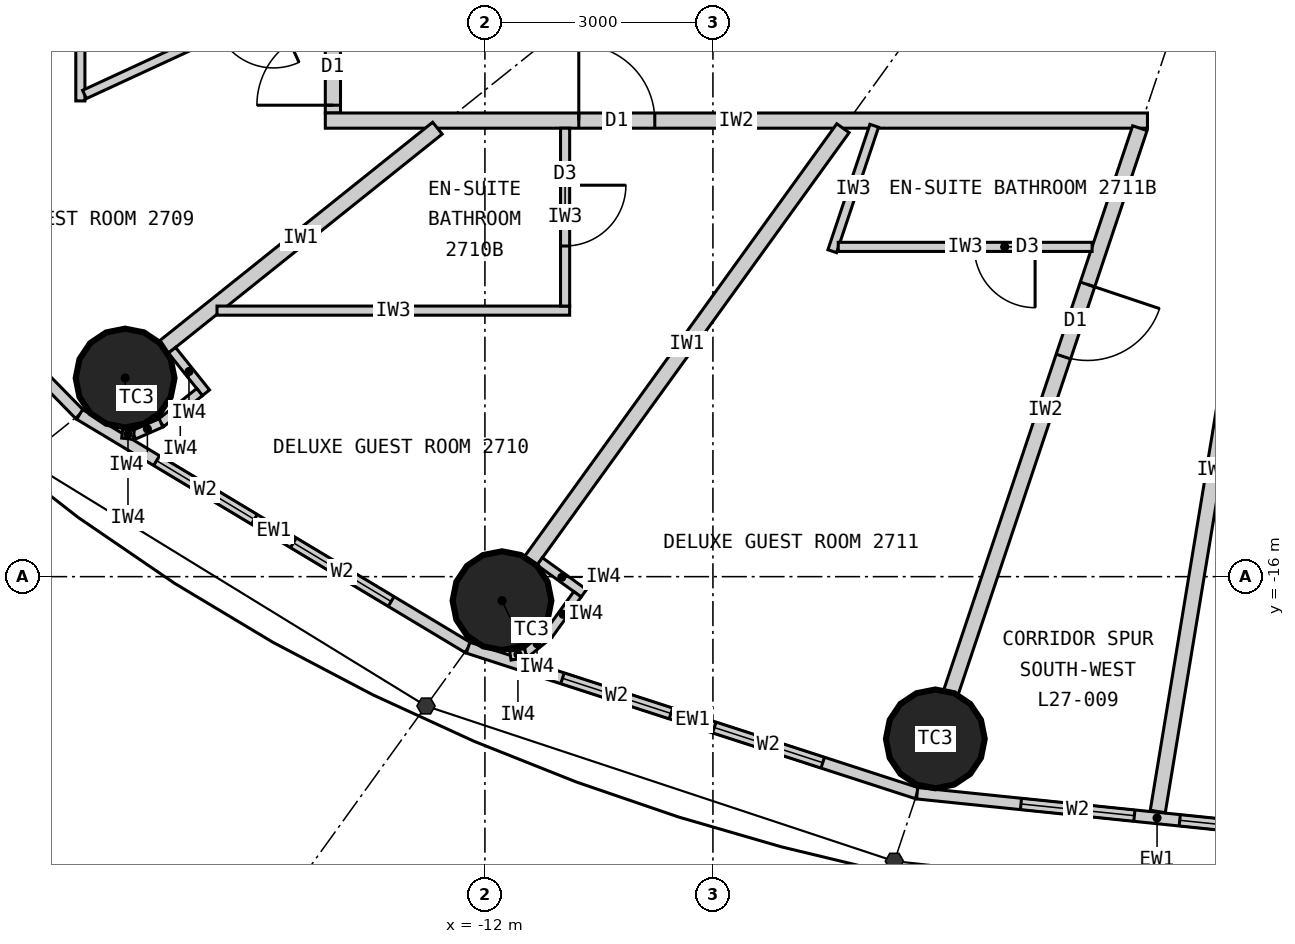
"""IFC4 building model, lengths in metres.
Left out: names, types, materials, properties, quantities, classifications, styles, units other than length and angle.
Written with IfcOpenShell. Run it as: python <this file> out.ifc"""

import sys

from ifc_helpers import new_model, si_unit, direction, frame, frame_2d, origin, origin_2d, place, context, subcontext, project, spatial, rectangle, circle, extrude, element, fill, save


model = new_model("IFC4")
c1 = context("Model", 3, precision=1e-05, world=origin(), true_north=direction((0.0, 1.0)))
c2 = subcontext(c1, "Body", "Model", "MODEL_VIEW")
j1 = project(units=[si_unit("LENGTHUNIT", "METRE"), si_unit("PLANEANGLEUNIT", "RADIAN")], contexts=[c1])
p1 = place(None, origin())
s1 = spatial("IfcSite", under=j1, at=p1, CompositionType="ELEMENT")
p2 = place(p1, origin())
s2 = spatial("IfcBuilding", under=s1, at=p2, CompositionType="ELEMENT")
p3 = place(p2, frame((0.0, 0.0, 108.9)))
s3 = spatial("IfcBuildingStorey", under=s2, at=p3, CompositionType="ELEMENT", Elevation=108.9)
for number, where, z_axis, x_axis in (
    (1, (-16.734, -13.387, 0.0), (0.0, 0.0, 1.0), (1.0, 0.0, 0.0)),
    (2, (-11.775, -16.316, 0.0), (0.0, 0.0, 1.0), (1.0, 0.0, 0.0)),
    (3, (-6.074, -18.135, 0.0), (0.0, 0.0, 1.0), (1.0, 0.0, 0.0)),
):
    element("IfcColumn", number, at=place(p3, frame(where, z_axis=z_axis, x_axis=x_axis)), inside=s3, PredefinedType="COLUMN", context=c2, shape_type="SweptSolid", body=[
        extrude(circle(Radius=0.65, at=origin_2d()), origin(), (0.0, 0.0, 1.0), 3.3),
    ])
p4 = place(p3, frame((-21.287, -9.832, 0.0), z_axis=(0.0, 0.0, 1.0), x_axis=(0.700136650834, -0.714008872605, 0.0)))
e4 = element("IfcWall", 4, at=p4, inside=s3, PredefinedType="ELEMENTEDWALL", context=c2, shape_type="SweptSolid", body=[
    extrude(rectangle(XDim=5.649, YDim=0.15, at=frame_2d((2.825, 0.0))), origin(), (0.0, 0.0, 1.0), 3.12),
])
p5 = place(p4, frame((1.025, 0.0, 0.9)))
e5 = element("IfcOpeningElement", 5, at=p5, cuts=e4, PredefinedType="OPENING", context=c2, shape_type="SweptSolid", body=[
    extrude(rectangle(XDim=1.5, YDim=1.9, at=frame_2d((0.75, 0.95))), frame((0.0, 0.085, 0.0), z_axis=(0.0, -1.0, 0.0), x_axis=(1.0, 0.0, 0.0)), (0.0, 0.0, 1.0), 0.17),
])
p6 = place(p4, frame((3.125, 0.0, 0.9)))
e6 = element("IfcOpeningElement", 6, at=p6, cuts=e4, PredefinedType="OPENING", context=c2, shape_type="SweptSolid", body=[
    extrude(rectangle(XDim=1.5, YDim=1.9, at=frame_2d((0.75, 0.95))), frame((0.0, 0.085, 0.0), z_axis=(0.0, -1.0, 0.0), x_axis=(1.0, 0.0, 0.0)), (0.0, 0.0, 1.0), 0.17),
])
p7 = place(p3, frame((-17.332, -13.866, 0.0), z_axis=(0.0, 0.0, 1.0), x_axis=(0.857308573723, -0.514802884044, 0.0)))
e7 = element("IfcWall", 7, at=p7, inside=s3, PredefinedType="ELEMENTEDWALL", context=c2, shape_type="SweptSolid", body=[
    extrude(rectangle(XDim=5.961, YDim=0.15, at=frame_2d((2.98, 0.0))), origin(), (0.0, 0.0, 1.0), 3.12),
])
p8 = place(p7, frame((1.181, 0.0, 0.9)))
e8 = element("IfcOpeningElement", 8, at=p8, cuts=e7, PredefinedType="OPENING", context=c2, shape_type="SweptSolid", body=[
    extrude(rectangle(XDim=1.5, YDim=1.9, at=frame_2d((0.75, 0.95))), frame((0.0, 0.085, 0.0), z_axis=(0.0, -1.0, 0.0), x_axis=(1.0, 0.0, 0.0)), (0.0, 0.0, 1.0), 0.17),
])
p9 = place(p7, frame((3.281, 0.0, 0.9)))
e9 = element("IfcOpeningElement", 9, at=p9, cuts=e7, PredefinedType="OPENING", context=c2, shape_type="SweptSolid", body=[
    extrude(rectangle(XDim=1.5, YDim=1.9, at=frame_2d((0.75, 0.95))), frame((0.0, 0.085, 0.0), z_axis=(0.0, -1.0, 0.0), x_axis=(1.0, 0.0, 0.0)), (0.0, 0.0, 1.0), 0.17),
])
p10 = place(p3, frame((-12.221, -16.935, 0.0), z_axis=(0.0, 0.0, 1.0), x_axis=(0.951272691506, -0.308350881944, 0.0)))
e10 = element("IfcWall", 10, at=p10, inside=s3, PredefinedType="ELEMENTEDWALL", context=c2, shape_type="SweptSolid", body=[
    extrude(rectangle(XDim=6.211, YDim=0.15, at=frame_2d((3.105, 0.0))), origin(), (0.0, 0.0, 1.0), 3.12),
])
p11 = place(p10, frame((1.305, 0.0, 0.9)))
e11 = element("IfcOpeningElement", 11, at=p11, cuts=e10, PredefinedType="OPENING", context=c2, shape_type="SweptSolid", body=[
    extrude(rectangle(XDim=1.5, YDim=1.9, at=frame_2d((0.75, 0.95))), frame((0.0, 0.085, 0.0), z_axis=(0.0, -1.0, 0.0), x_axis=(1.0, 0.0, 0.0)), (0.0, 0.0, 1.0), 0.17),
])
p12 = place(p10, frame((3.405, 0.0, 0.9)))
e12 = element("IfcOpeningElement", 12, at=p12, cuts=e10, PredefinedType="OPENING", context=c2, shape_type="SweptSolid", body=[
    extrude(rectangle(XDim=1.5, YDim=1.9, at=frame_2d((0.75, 0.95))), frame((0.0, 0.085, 0.0), z_axis=(0.0, -1.0, 0.0), x_axis=(1.0, 0.0, 0.0)), (0.0, 0.0, 1.0), 0.17),
])
p13 = place(p3, frame((-6.313, -18.85, 0.0), z_axis=(0.0, 0.0, 1.0), x_axis=(0.994735690163, -0.102473931887, 0.0)))
e13 = element("IfcWall", 13, at=p13, inside=s3, PredefinedType="ELEMENTEDWALL", context=c2, shape_type="SweptSolid", body=[
    extrude(rectangle(XDim=6.347, YDim=0.15, at=frame_2d((3.173, 0.0))), origin(), (0.0, 0.0, 1.0), 3.12),
])
p14 = place(p13, frame((1.373, 0.0, 0.9)))
e14 = element("IfcOpeningElement", 14, at=p14, cuts=e13, PredefinedType="OPENING", context=c2, shape_type="SweptSolid", body=[
    extrude(rectangle(XDim=1.5, YDim=1.9, at=frame_2d((0.75, 0.95))), frame((0.0, 0.085, 0.0), z_axis=(0.0, -1.0, 0.0), x_axis=(1.0, 0.0, 0.0)), (0.0, 0.0, 1.0), 0.17),
])
p15 = place(p13, frame((3.473, 0.0, 0.9)))
e15 = element("IfcOpeningElement", 15, at=p15, cuts=e13, PredefinedType="OPENING", context=c2, shape_type="SweptSolid", body=[
    extrude(rectangle(XDim=1.5, YDim=1.9, at=frame_2d((0.75, 0.95))), frame((0.0, 0.085, 0.0), z_axis=(0.0, -1.0, 0.0), x_axis=(1.0, 0.0, 0.0)), (0.0, 0.0, 1.0), 0.17),
])
p16 = place(p3, frame((-14.0, 9.9, 0.0), z_axis=(0.0, 0.0, 1.0), x_axis=(0.0, -1.0, 0.0)))
e16 = element("IfcWall", 16, at=p16, inside=s3, PredefinedType="PARTITIONING", context=c2, shape_type="SweptSolid", body=[
    extrude(rectangle(XDim=19.8, YDim=0.2, at=frame_2d((9.9, 0.0))), origin(), (0.0, 0.0, 1.0), 3.12),
])
p17 = place(p16, frame((3.622, 0.0, 0.0)))
e17 = element("IfcOpeningElement", 17, at=p17, cuts=e16, PredefinedType="OPENING", context=c2, shape_type="SweptSolid", body=[
    extrude(rectangle(XDim=1.0, YDim=2.2, at=frame_2d((0.5, 1.1))), frame((0.0, 0.11, 0.0), z_axis=(0.0, -1.0, 0.0), x_axis=(1.0, 0.0, 0.0)), (0.0, 0.0, 1.0), 0.22),
])
p18 = place(p16, frame((9.238, 0.0, 0.0)))
e18 = element("IfcOpeningElement", 18, at=p18, cuts=e16, PredefinedType="OPENING", context=c2, shape_type="SweptSolid", body=[
    extrude(rectangle(XDim=1.0, YDim=2.2, at=frame_2d((0.5, 1.1))), frame((0.0, 0.11, 0.0), z_axis=(0.0, -1.0, 0.0), x_axis=(1.0, 0.0, 0.0)), (0.0, 0.0, 1.0), 0.22),
])
p19 = place(p16, frame((13.742, 0.0, 0.0)))
e19 = element("IfcOpeningElement", 19, at=p19, cuts=e16, PredefinedType="OPENING", context=c2, shape_type="SweptSolid", body=[
    extrude(rectangle(XDim=1.0, YDim=2.2, at=frame_2d((0.5, 1.1))), frame((0.0, 0.11, 0.0), z_axis=(0.0, -1.0, 0.0), x_axis=(1.0, 0.0, 0.0)), (0.0, 0.0, 1.0), 0.22),
])
p20 = place(p16, frame((18.698, 0.0, 0.0)))
e20 = element("IfcOpeningElement", 20, at=p20, cuts=e16, PredefinedType="OPENING", context=c2, shape_type="SweptSolid", body=[
    extrude(rectangle(XDim=1.0, YDim=2.2, at=frame_2d((0.5, 1.1))), frame((0.0, 0.11, 0.0), z_axis=(0.0, -1.0, 0.0), x_axis=(1.0, 0.0, 0.0)), (0.0, 0.0, 1.0), 0.22),
])
p21 = place(p3, frame((-3.283, -10.0, 0.0), z_axis=(0.0, 0.0, 1.0), x_axis=(-1.0, 0.0, 0.0)))
e21 = element("IfcWall", 21, at=p21, inside=s3, PredefinedType="PARTITIONING", context=c2, shape_type="SweptSolid", body=[
    extrude(rectangle(XDim=10.817, YDim=0.2, at=frame_2d((5.409, 0.0))), origin(), (0.0, 0.0, 1.0), 3.12),
])
p22 = place(p21, frame((6.482, 0.0, 0.0)))
e22 = element("IfcOpeningElement", 22, at=p22, cuts=e21, PredefinedType="OPENING", context=c2, shape_type="SweptSolid", body=[
    extrude(rectangle(XDim=1.0, YDim=2.2, at=frame_2d((0.5, 1.1))), frame((0.0, 0.11, 0.0), z_axis=(0.0, -1.0, 0.0), x_axis=(1.0, 0.0, 0.0)), (0.0, 0.0, 1.0), 0.22),
])
p23 = place(p3, frame((-14.1, -6.512, 0.0), z_axis=(0.0, 0.0, 1.0), x_axis=(-0.907833019998, -0.419331858797, 0.0)))
e23 = element("IfcWall", 23, at=p23, inside=s3, PredefinedType="PARTITIONING", context=c2, shape_type="SweptSolid", body=[
    extrude(rectangle(XDim=6.505, YDim=0.2, at=frame_2d((3.252, 0.0))), origin(), (0.0, 0.0, 1.0), 2.27),
])
p24 = place(p3, frame((-12.625, -10.1, 0.0), z_axis=(0.0, 0.0, 1.0), x_axis=(-0.780863644897, -0.624701503182, 0.0)))
e24 = element("IfcWall", 24, at=p24, inside=s3, PredefinedType="PARTITIONING", context=c2, shape_type="SweptSolid", body=[
    extrude(rectangle(XDim=4.612, YDim=0.2, at=frame_2d((2.306, 0.0))), origin(), (0.0, 0.0, 1.0), 2.37),
])
p25 = place(p3, frame((-7.289, -10.1, 0.0), z_axis=(0.0, 0.0, 1.0), x_axis=(-0.585217367024, -0.81087645997, 0.0)))
e25 = element("IfcWall", 25, at=p25, inside=s3, PredefinedType="PARTITIONING", context=c2, shape_type="SweptSolid", body=[
    extrude(rectangle(XDim=7.016, YDim=0.2, at=frame_2d((3.508, 0.0))), origin(), (0.0, 0.0, 1.0), 2.37),
])
p26 = place(p3, frame((-3.383, -10.1, 0.0), z_axis=(0.0, 0.0, 1.0), x_axis=(-0.317603705574, -0.948223542318, 0.0)))
e26 = element("IfcWall", 26, at=p26, inside=s3, PredefinedType="PARTITIONING", context=c2, shape_type="SweptSolid", body=[
    extrude(rectangle(XDim=7.823, YDim=0.2, at=frame_2d((3.912, 0.0))), origin(), (0.0, 0.0, 1.0), 2.37),
])
p27 = place(p26, frame((2.168, 0.0, 0.0)))
e27 = element("IfcOpeningElement", 27, at=p27, cuts=e26, PredefinedType="OPENING", context=c2, shape_type="SweptSolid", body=[
    extrude(rectangle(XDim=1.0, YDim=2.2, at=frame_2d((0.5, 1.1))), frame((0.0, 0.11, 0.0), z_axis=(0.0, -1.0, 0.0), x_axis=(1.0, 0.0, 0.0)), (0.0, 0.0, 1.0), 0.22),
])
p28 = place(p3, frame((-1.665, -10.1, 0.0), z_axis=(0.0, 0.0, 1.0), x_axis=(-0.162660519103, -0.986682094459, 0.0)))
e28 = element("IfcWall", 28, at=p28, inside=s3, PredefinedType="PARTITIONING", context=c2, shape_type="SweptSolid", body=[
    extrude(rectangle(XDim=9.111, YDim=0.2, at=frame_2d((4.555, 0.0))), origin(), (0.0, 0.0, 1.0), 3.12),
])
p29 = place(p28, frame((1.86, 0.0, 0.0)))
e29 = element("IfcOpeningElement", 29, at=p29, cuts=e28, PredefinedType="OPENING", context=c2, shape_type="SweptSolid", body=[
    extrude(rectangle(XDim=1.0, YDim=2.2, at=frame_2d((0.5, 1.1))), frame((0.0, 0.11, 0.0), z_axis=(0.0, -1.0, 0.0), x_axis=(1.0, 0.0, 0.0)), (0.0, 0.0, 1.0), 0.22),
])
p30 = place(p3, frame((-17.323, -8.101, 0.0), z_axis=(0.0, 0.0, 1.0), x_axis=(0.0, -1.0, 0.0)))
e30 = element("IfcWall", 30, at=p30, inside=s3, PredefinedType="PARTITIONING", context=c2, shape_type="SweptSolid", body=[
    extrude(rectangle(XDim=1.64, YDim=0.12, at=frame_2d((0.82, 0.0))), origin(), (0.0, 0.0, 1.0), 3.12),
])
p31 = place(p3, frame((-14.1, -8.193, 0.0), z_axis=(0.0, 0.0, 1.0), x_axis=(-0.907836493557, -0.419324338628, 0.0)))
e31 = element("IfcWall", 31, at=p31, inside=s3, PredefinedType="PARTITIONING", context=c2, shape_type="SweptSolid", body=[
    extrude(rectangle(XDim=3.49, YDim=0.12, at=frame_2d((1.745, 0.0))), origin(), (0.0, 0.0, 1.0), 3.12),
])
p32 = place(p31, frame((0.75, 0.0, 0.0)))
e32 = element("IfcOpeningElement", 32, at=p32, cuts=e31, PredefinedType="OPENING", context=c2, shape_type="SweptSolid", body=[
    extrude(rectangle(XDim=0.8, YDim=2.1, at=frame_2d((0.4, 1.05))), frame((0.0, 0.07, 0.0), z_axis=(0.0, -1.0, 0.0), x_axis=(1.0, 0.0, 0.0)), (0.0, 0.0, 1.0), 0.14),
])
p33 = place(p3, frame((-15.525, -12.5, 0.0), z_axis=(0.0, 0.0, 1.0), x_axis=(1.0, 0.0, 0.0)))
e33 = element("IfcWall", 33, at=p33, inside=s3, PredefinedType="PARTITIONING", context=c2, shape_type="SweptSolid", body=[
    extrude(rectangle(XDim=4.64, YDim=0.12, at=frame_2d((2.32, 0.0))), origin(), (0.0, 0.0, 1.0), 3.12),
])
p34 = place(p3, frame((-10.945, -10.1, 0.0), z_axis=(0.0, 0.0, 1.0), x_axis=(0.0, -1.0, 0.0)))
e34 = element("IfcWall", 34, at=p34, inside=s3, PredefinedType="PARTITIONING", context=c2, shape_type="SweptSolid", body=[
    extrude(rectangle(XDim=2.34, YDim=0.12, at=frame_2d((1.17, 0.0))), origin(), (0.0, 0.0, 1.0), 3.12),
])
p35 = place(p34, frame((0.75, 0.0, 0.0)))
e35 = element("IfcOpeningElement", 35, at=p35, cuts=e34, PredefinedType="OPENING", context=c2, shape_type="SweptSolid", body=[
    extrude(rectangle(XDim=0.8, YDim=2.1, at=frame_2d((0.4, 1.05))), frame((0.0, 0.07, 0.0), z_axis=(0.0, -1.0, 0.0), x_axis=(1.0, 0.0, 0.0)), (0.0, 0.0, 1.0), 0.14),
])
p36 = place(p3, frame((-6.878, -10.068, 0.0), z_axis=(0.0, 0.0, 1.0), x_axis=(-0.317532394508, -0.948247424694, 0.0)))
e36 = element("IfcWall", 36, at=p36, inside=s3, PredefinedType="PARTITIONING", context=c2, shape_type="SweptSolid", body=[
    extrude(rectangle(XDim=1.74, YDim=0.12, at=frame_2d((0.87, 0.0))), origin(), (0.0, 0.0, 1.0), 3.12),
])
p37 = place(p3, frame((-4.011, -11.661, 0.0), z_axis=(0.0, 0.0, 1.0), x_axis=(-1.0, 0.0, 0.0)))
e37 = element("IfcWall", 37, at=p37, inside=s3, PredefinedType="PARTITIONING", context=c2, shape_type="SweptSolid", body=[
    extrude(rectangle(XDim=3.34, YDim=0.12, at=frame_2d((1.67, 0.0))), origin(), (0.0, 0.0, 1.0), 3.12),
])
p38 = place(p37, frame((0.75, 0.0, 0.0)))
e38 = element("IfcOpeningElement", 38, at=p38, cuts=e37, PredefinedType="OPENING", context=c2, shape_type="SweptSolid", body=[
    extrude(rectangle(XDim=0.8, YDim=2.1, at=frame_2d((0.4, 1.05))), frame((0.0, 0.07, 0.0), z_axis=(0.0, -1.0, 0.0), x_axis=(1.0, 0.0, 0.0)), (0.0, 0.0, 1.0), 0.14),
])
p39 = place(p3, frame((-16.117, -13.022, 0.0), z_axis=(0.0, 0.0, 1.0), x_axis=(0.62465344249, -0.780902091677, 0.0)))
e39 = element("IfcWall", 39, at=p39, inside=s3, PredefinedType="PARTITIONING", context=c2, shape_type="SweptSolid", body=[
    extrude(rectangle(XDim=0.716, YDim=0.12, at=frame_2d((0.358, 0.0))), origin(), (0.0, 0.0, 1.0), 3.12),
])
p40 = place(p3, frame((-15.754, -13.571, 0.0), z_axis=(0.0, 0.0, 1.0), x_axis=(-0.780905453553, -0.624649239663, 0.0)))
e40 = element("IfcWall", 40, at=p40, inside=s3, PredefinedType="PARTITIONING", context=c2, shape_type="SweptSolid", body=[
    extrude(rectangle(XDim=0.65, YDim=0.12, at=frame_2d((0.325, 0.0))), origin(), (0.0, 0.0, 1.0), 3.12),
])
p41 = place(p3, frame((-16.262, -13.977, 0.0), z_axis=(0.0, 0.0, 1.0), x_axis=(-0.915985403703, -0.401211590314, 0.0)))
e41 = element("IfcWall", 41, at=p41, inside=s3, PredefinedType="PARTITIONING", context=c2, shape_type="SweptSolid", body=[
    extrude(rectangle(XDim=0.391, YDim=0.12, at=frame_2d((0.196, 0.0))), origin(), (0.0, 0.0, 1.0), 3.12),
])
p42 = place(p3, frame((-16.62, -14.134, 0.0), z_axis=(0.0, 0.0, 1.0), x_axis=(-0.993941871493, 0.109907033867, 0.0)))
e42 = element("IfcWall", 42, at=p42, inside=s3, PredefinedType="PARTITIONING", context=c2, shape_type="SweptSolid", body=[
    extrude(rectangle(XDim=0.153, YDim=0.12, at=frame_2d((0.077, 0.0))), origin(), (0.0, 0.0, 1.0), 3.12),
])
p43 = place(p3, frame((-11.279, -15.799, 0.0), z_axis=(0.0, 0.0, 1.0), x_axis=(0.810912957127, -0.585166793285, 0.0)))
e43 = element("IfcWall", 43, at=p43, inside=s3, PredefinedType="PARTITIONING", context=c2, shape_type="SweptSolid", body=[
    extrude(rectangle(XDim=0.716, YDim=0.12, at=frame_2d((0.358, 0.0))), origin(), (0.0, 0.0, 1.0), 3.12),
])
p44 = place(p3, frame((-10.782, -16.231, 0.0), z_axis=(0.0, 0.0, 1.0), x_axis=(-0.585175102182, -0.810906961239, 0.0)))
e44 = element("IfcWall", 44, at=p44, inside=s3, PredefinedType="PARTITIONING", context=c2, shape_type="SweptSolid", body=[
    extrude(rectangle(XDim=0.65, YDim=0.12, at=frame_2d((0.325, 0.0))), origin(), (0.0, 0.0, 1.0), 3.12),
])
p45 = place(p3, frame((-11.162, -16.759, 0.0), z_axis=(0.0, 0.0, 1.0), x_axis=(-0.775178428527, -0.63174235567, 0.0)))
e45 = element("IfcWall", 45, at=p45, inside=s3, PredefinedType="PARTITIONING", context=c2, shape_type="SweptSolid", body=[
    extrude(rectangle(XDim=0.392, YDim=0.12, at=frame_2d((0.196, 0.0))), origin(), (0.0, 0.0, 1.0), 3.12),
])
p46 = place(p3, frame((-11.466, -17.006, 0.0), z_axis=(0.0, 0.0, 1.0), x_axis=(-0.987228877621, -0.15930832744, 0.0)))
e46 = element("IfcWall", 46, at=p46, inside=s3, PredefinedType="PARTITIONING", context=c2, shape_type="SweptSolid", body=[
    extrude(rectangle(XDim=0.202, YDim=0.12, at=frame_2d((0.101, 0.0))), origin(), (0.0, 0.0, 1.0), 3.12),
])
p47 = place(p8, origin())
e47 = element("IfcWindow", 47, at=p47, inside=s3, PartitioningType="SINGLE_PANEL", PredefinedType="WINDOW", context=c2, shape_type="SweptSolid", body=[
    extrude(rectangle(XDim=1.5, YDim=1.9, at=frame_2d((0.75, 0.95))), frame((0.0, 0.03, 0.0), z_axis=(0.0, -1.0, 0.0), x_axis=(1.0, 0.0, 0.0)), (0.0, 0.0, 1.0), 0.06),
])
fill(e8, e47)
p48 = place(p9, origin())
e48 = element("IfcWindow", 48, at=p48, inside=s3, PartitioningType="SINGLE_PANEL", PredefinedType="WINDOW", context=c2, shape_type="SweptSolid", body=[
    extrude(rectangle(XDim=1.5, YDim=1.9, at=frame_2d((0.75, 0.95))), frame((0.0, 0.03, 0.0), z_axis=(0.0, -1.0, 0.0), x_axis=(1.0, 0.0, 0.0)), (0.0, 0.0, 1.0), 0.06),
])
fill(e9, e48)
p49 = place(p11, origin())
e49 = element("IfcWindow", 49, at=p49, inside=s3, PartitioningType="SINGLE_PANEL", PredefinedType="WINDOW", context=c2, shape_type="SweptSolid", body=[
    extrude(rectangle(XDim=1.5, YDim=1.9, at=frame_2d((0.75, 0.95))), frame((0.0, 0.03, 0.0), z_axis=(0.0, -1.0, 0.0), x_axis=(1.0, 0.0, 0.0)), (0.0, 0.0, 1.0), 0.06),
])
fill(e11, e49)
p50 = place(p12, origin())
e50 = element("IfcWindow", 50, at=p50, inside=s3, PartitioningType="SINGLE_PANEL", PredefinedType="WINDOW", context=c2, shape_type="SweptSolid", body=[
    extrude(rectangle(XDim=1.5, YDim=1.9, at=frame_2d((0.75, 0.95))), frame((0.0, 0.03, 0.0), z_axis=(0.0, -1.0, 0.0), x_axis=(1.0, 0.0, 0.0)), (0.0, 0.0, 1.0), 0.06),
])
fill(e12, e50)
p51 = place(p14, origin())
e51 = element("IfcWindow", 51, at=p51, inside=s3, PartitioningType="SINGLE_PANEL", PredefinedType="WINDOW", context=c2, shape_type="SweptSolid", body=[
    extrude(rectangle(XDim=1.5, YDim=1.9, at=frame_2d((0.75, 0.95))), frame((0.0, 0.03, 0.0), z_axis=(0.0, -1.0, 0.0), x_axis=(1.0, 0.0, 0.0)), (0.0, 0.0, 1.0), 0.06),
])
fill(e14, e51)
p52 = place(p15, origin())
e52 = element("IfcWindow", 52, at=p52, inside=s3, PartitioningType="SINGLE_PANEL", PredefinedType="WINDOW", context=c2, shape_type="SweptSolid", body=[
    extrude(rectangle(XDim=1.5, YDim=1.9, at=frame_2d((0.75, 0.95))), frame((0.0, 0.03, 0.0), z_axis=(0.0, -1.0, 0.0), x_axis=(1.0, 0.0, 0.0)), (0.0, 0.0, 1.0), 0.06),
])
fill(e15, e52)
p53 = place(p20, origin())
e53 = element("IfcDoor", 53, at=p53, inside=s3, OperationType="SINGLE_SWING_RIGHT", PredefinedType="DOOR", context=c2, shape_type="SweptSolid", body=[
    extrude(rectangle(XDim=1.0, YDim=2.2, at=frame_2d((0.5, 1.1))), frame((0.0, 0.025, 0.0), z_axis=(0.0, -1.0, 0.0), x_axis=(1.0, 0.0, 0.0)), (0.0, 0.0, 1.0), 0.05),
])
fill(e20, e53)
p54 = place(p35, origin())
e54 = element("IfcDoor", 54, at=p54, inside=s3, OperationType="SINGLE_SWING_LEFT", PredefinedType="DOOR", context=c2, shape_type="SweptSolid", body=[
    extrude(rectangle(XDim=0.8, YDim=2.1, at=frame_2d((0.4, 1.05))), frame((0.0, 0.025, 0.0), z_axis=(0.0, -1.0, 0.0), x_axis=(1.0, 0.0, 0.0)), (0.0, 0.0, 1.0), 0.05),
])
fill(e35, e54)
p55 = place(p22, origin())
e55 = element("IfcDoor", 55, at=p55, inside=s3, OperationType="SINGLE_SWING_RIGHT", PredefinedType="DOOR", context=c2, shape_type="SweptSolid", body=[
    extrude(rectangle(XDim=1.0, YDim=2.2, at=frame_2d((0.5, 1.1))), frame((0.0, 0.025, 0.0), z_axis=(0.0, -1.0, 0.0), x_axis=(1.0, 0.0, 0.0)), (0.0, 0.0, 1.0), 0.05),
])
fill(e22, e55)
p56 = place(p38, origin())
e56 = element("IfcDoor", 56, at=p56, inside=s3, OperationType="SINGLE_SWING_LEFT", PredefinedType="DOOR", context=c2, shape_type="SweptSolid", body=[
    extrude(rectangle(XDim=0.8, YDim=2.1, at=frame_2d((0.4, 1.05))), frame((0.0, 0.025, 0.0), z_axis=(0.0, -1.0, 0.0), x_axis=(1.0, 0.0, 0.0)), (0.0, 0.0, 1.0), 0.05),
])
fill(e38, e56)
p57 = place(p27, origin())
e57 = element("IfcDoor", 57, at=p57, inside=s3, OperationType="SINGLE_SWING_LEFT", PredefinedType="DOOR", context=c2, shape_type="SweptSolid", body=[
    extrude(rectangle(XDim=1.0, YDim=2.2, at=frame_2d((0.5, 1.1))), frame((0.0, 0.025, 0.0), z_axis=(0.0, -1.0, 0.0), x_axis=(1.0, 0.0, 0.0)), (0.0, 0.0, 1.0), 0.05),
])
fill(e27, e57)
save(model, sys.argv[1])
